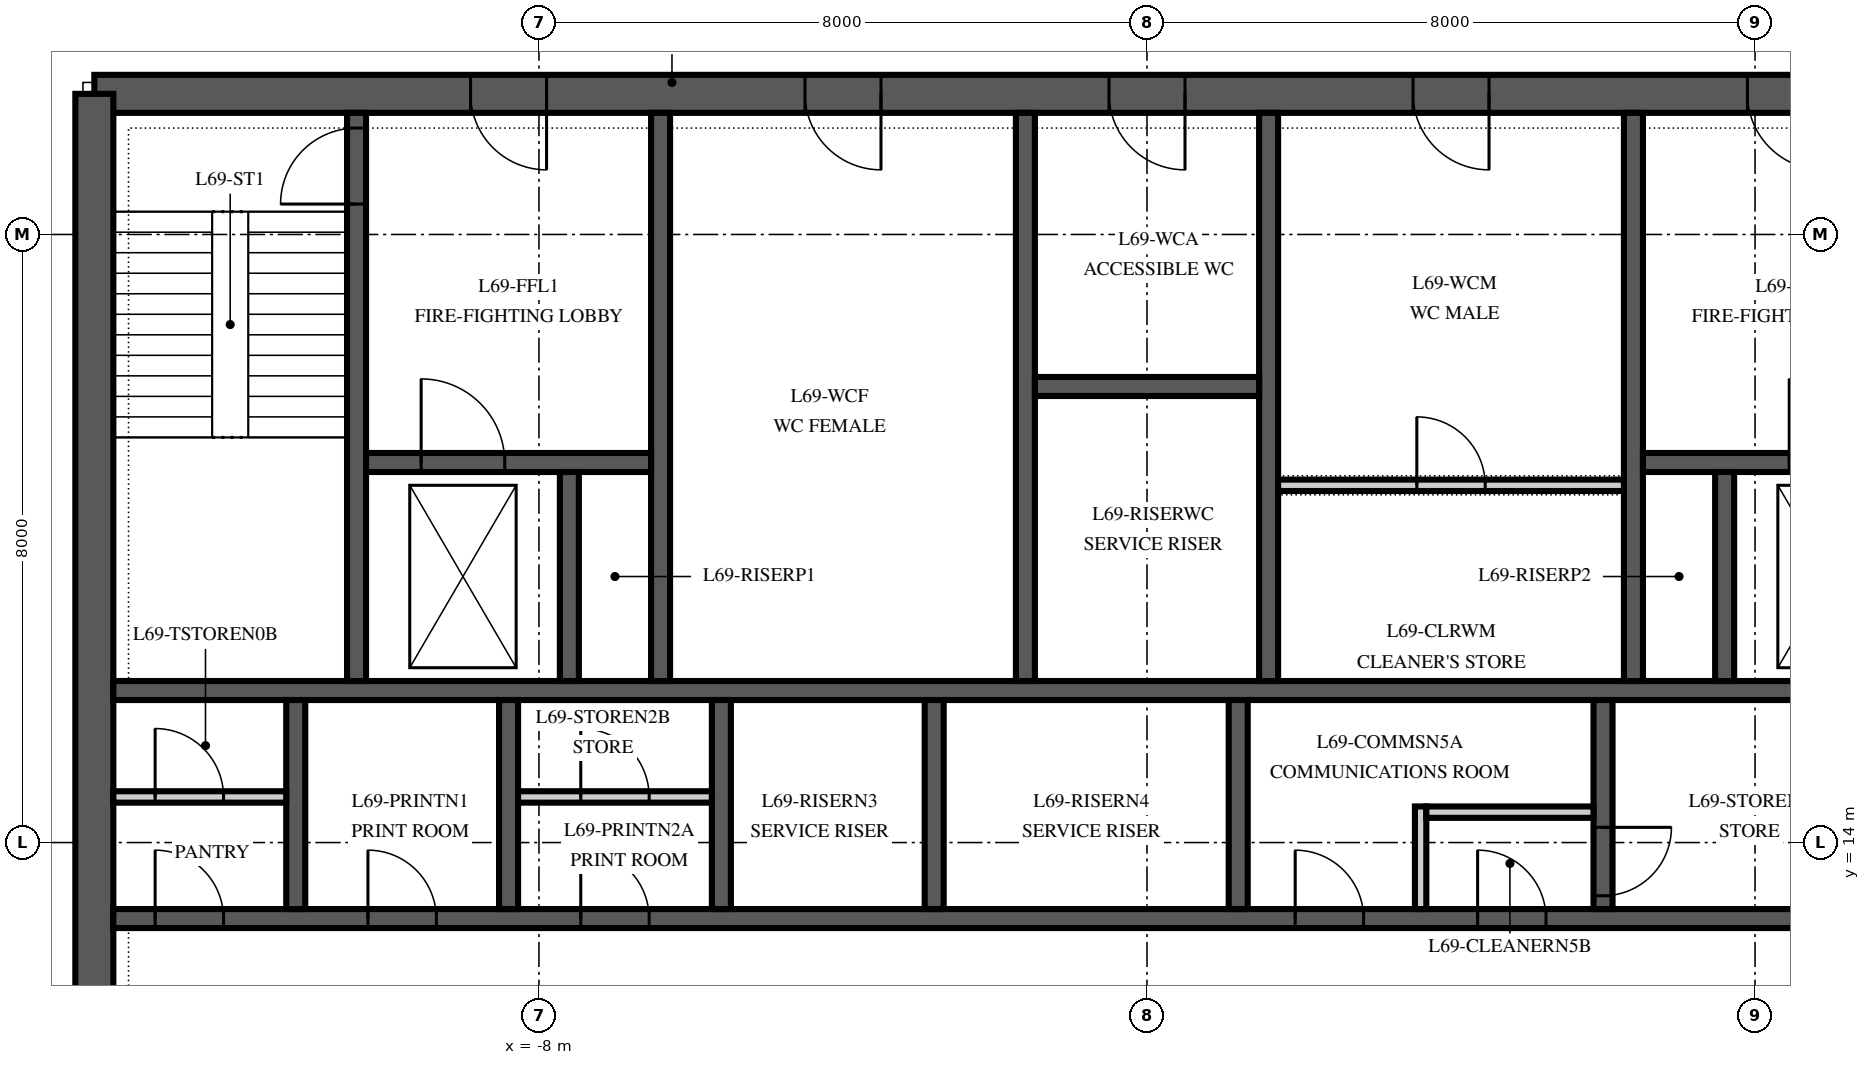
"""IFC4 building model, lengths in metres.
Left out: names, types, materials, properties, quantities, classifications, styles, units other than length and angle.
Written with IfcOpenShell. Run it as: python <this file> out.ifc"""

import sys

from ifc_helpers import new_model, si_unit, direction, frame, frame_2d, origin, place, context, subcontext, project, spatial, polyline, rectangle, outline, extrude, element, fill, save


model = new_model("IFC4")
c1 = context("Model", 3, precision=1e-05, world=origin(), true_north=direction((0.0, 1.0)))
c2 = subcontext(c1, "Body", "Model", "MODEL_VIEW")
j1 = project(units=[si_unit("LENGTHUNIT", "METRE"), si_unit("PLANEANGLEUNIT", "RADIAN")], contexts=[c1])
p1 = place(None, origin())
s1 = spatial("IfcSite", under=j1, at=p1, CompositionType="ELEMENT")
p2 = place(p1, origin())
s2 = spatial("IfcBuilding", under=s1, at=p2, CompositionType="ELEMENT")
p3 = place(p2, frame((0.0, 0.0, 296.0)))
s3 = spatial("IfcBuildingStorey", under=s2, at=p3, CompositionType="ELEMENT", Elevation=296.0)
p4 = place(p3, frame((13.85, 23.85, 0.0), z_axis=(0.0, 0.0, 1.0), x_axis=(-1.0, 0.0, 0.0)))
e1 = element("IfcWall", 1, at=p4, inside=s3, PredefinedType="SHEAR", context=c2, shape_type="SweptSolid", body=[
    extrude(rectangle(XDim=27.7, YDim=0.5, at=frame_2d((13.85, 0.0))), origin(), (0.0, 0.0, 1.0), 4.0),
])
p5 = place(p4, frame((21.75, 0.0, 0.0)))
e2 = element("IfcOpeningElement", 2, at=p5, cuts=e1, PredefinedType="OPENING", context=c2, shape_type="SweptSolid", body=[
    extrude(rectangle(XDim=1.0, YDim=2.1, at=frame_2d((0.5, 1.05))), frame((0.0, 0.265, 0.0), z_axis=(0.0, -1.0, 0.0), x_axis=(1.0, 0.0, 0.0)), (0.0, 0.0, 1.0), 0.53),
])
p6 = place(p4, frame((4.95, 0.0, 0.0)))
e3 = element("IfcOpeningElement", 3, at=p6, cuts=e1, PredefinedType="OPENING", context=c2, shape_type="SweptSolid", body=[
    extrude(rectangle(XDim=1.0, YDim=2.1, at=frame_2d((0.5, 1.05))), frame((0.0, 0.265, 0.0), z_axis=(0.0, -1.0, 0.0), x_axis=(1.0, 0.0, 0.0)), (0.0, 0.0, 1.0), 0.53),
])
p7 = place(p4, frame((17.35, 0.0, 0.0)))
e4 = element("IfcOpeningElement", 4, at=p7, cuts=e1, PredefinedType="OPENING", context=c2, shape_type="SweptSolid", body=[
    extrude(rectangle(XDim=1.0, YDim=2.1, at=frame_2d((0.5, 1.05))), frame((0.0, 0.265, 0.0), z_axis=(0.0, -1.0, 0.0), x_axis=(1.0, 0.0, 0.0)), (0.0, 0.0, 1.0), 0.53),
])
p8 = place(p4, frame((13.35, 0.0, 0.0)))
e5 = element("IfcOpeningElement", 5, at=p8, cuts=e1, PredefinedType="OPENING", context=c2, shape_type="SweptSolid", body=[
    extrude(rectangle(XDim=1.0, YDim=2.1, at=frame_2d((0.5, 1.05))), frame((0.0, 0.265, 0.0), z_axis=(0.0, -1.0, 0.0), x_axis=(1.0, 0.0, 0.0)), (0.0, 0.0, 1.0), 0.53),
])
p9 = place(p4, frame((9.35, 0.0, 0.0)))
e6 = element("IfcOpeningElement", 6, at=p9, cuts=e1, PredefinedType="OPENING", context=c2, shape_type="SweptSolid", body=[
    extrude(rectangle(XDim=1.0, YDim=2.1, at=frame_2d((0.5, 1.05))), frame((0.0, 0.265, 0.0), z_axis=(0.0, -1.0, 0.0), x_axis=(1.0, 0.0, 0.0)), (0.0, 0.0, 1.0), 0.53),
])
p10 = place(p3, frame((-13.85, 23.85, 0.0), z_axis=(0.0, 0.0, 1.0), x_axis=(0.0, -1.0, 0.0)))
e7 = element("IfcWall", 7, at=p10, inside=s3, PredefinedType="SHEAR", context=c2, shape_type="SweptSolid", body=[
    extrude(outline(polyline([(0.0, -0.25), (17.7, -0.25), (17.7, 0.0), (17.45, 0.0), (17.45, 0.25), (0.25, 0.25), (0.25, 0.0), (0.0, 0.0), (0.0, -0.25)])), origin(), (0.0, 0.0, 1.0), 4.0),
])
p11 = place(p10, frame((11.75, 0.0, 0.0)))
e8 = element("IfcOpeningElement", 8, at=p11, cuts=e7, PredefinedType="OPENING", context=c2, shape_type="SweptSolid", body=[
    extrude(rectangle(XDim=1.8, YDim=2.4, at=frame_2d((0.9, 1.2))), frame((0.0, 0.265, 0.0), z_axis=(0.0, -1.0, 0.0), x_axis=(1.0, 0.0, 0.0)), (0.0, 0.0, 1.0), 0.53),
])
p12 = place(p3, frame((-13.6, 13.0, 0.0), z_axis=(0.0, 0.0, 1.0), x_axis=(1.0, 0.0, 0.0)))
e9 = element("IfcWall", 9, at=p12, inside=s3, PredefinedType="SHEAR", context=c2, shape_type="SweptSolid", body=[
    extrude(rectangle(XDim=27.2, YDim=0.25, at=frame_2d((13.6, 0.0))), origin(), (0.0, 0.0, 1.0), 4.0),
])
p13 = place(p12, frame((15.55, 0.0, 0.0)))
e10 = element("IfcOpeningElement", 10, at=p13, cuts=e9, PredefinedType="OPENING", context=c2, shape_type="SweptSolid", body=[
    extrude(rectangle(XDim=0.9, YDim=2.1, at=frame_2d((0.45, 1.05))), frame((0.0, 0.14, 0.0), z_axis=(0.0, -1.0, 0.0), x_axis=(1.0, 0.0, 0.0)), (0.0, 0.0, 1.0), 0.28),
])
p14 = place(p12, frame((17.95, 0.0, 0.0)))
e11 = element("IfcOpeningElement", 11, at=p14, cuts=e9, PredefinedType="OPENING", context=c2, shape_type="SweptSolid", body=[
    extrude(rectangle(XDim=0.9, YDim=2.1, at=frame_2d((0.45, 1.05))), frame((0.0, 0.14, 0.0), z_axis=(0.0, -1.0, 0.0), x_axis=(1.0, 0.0, 0.0)), (0.0, 0.0, 1.0), 0.28),
])
p15 = place(p12, frame((0.55, 0.0, 0.0)))
e12 = element("IfcOpeningElement", 12, at=p15, cuts=e9, PredefinedType="OPENING", context=c2, shape_type="SweptSolid", body=[
    extrude(rectangle(XDim=0.9, YDim=2.1, at=frame_2d((0.45, 1.05))), frame((0.0, 0.14, 0.0), z_axis=(0.0, -1.0, 0.0), x_axis=(1.0, 0.0, 0.0)), (0.0, 0.0, 1.0), 0.28),
])
p16 = place(p12, frame((3.35, 0.0, 0.0)))
e13 = element("IfcOpeningElement", 13, at=p16, cuts=e9, PredefinedType="OPENING", context=c2, shape_type="SweptSolid", body=[
    extrude(rectangle(XDim=0.9, YDim=2.1, at=frame_2d((0.45, 1.05))), frame((0.0, 0.14, 0.0), z_axis=(0.0, -1.0, 0.0), x_axis=(1.0, 0.0, 0.0)), (0.0, 0.0, 1.0), 0.28),
])
p17 = place(p12, frame((6.15, 0.0, 0.0)))
e14 = element("IfcOpeningElement", 14, at=p17, cuts=e9, PredefinedType="OPENING", context=c2, shape_type="SweptSolid", body=[
    extrude(rectangle(XDim=0.9, YDim=2.1, at=frame_2d((0.45, 1.05))), frame((0.0, 0.14, 0.0), z_axis=(0.0, -1.0, 0.0), x_axis=(1.0, 0.0, 0.0)), (0.0, 0.0, 1.0), 0.28),
])
p18 = place(p3, frame((-13.6, 16.0, 0.0), z_axis=(0.0, 0.0, 1.0), x_axis=(1.0, 0.0, 0.0)))
e15 = element("IfcWall", 15, at=p18, inside=s3, PredefinedType="SHEAR", context=c2, shape_type="SweptSolid", body=[
    extrude(rectangle(XDim=27.2, YDim=0.25, at=frame_2d((13.6, 0.0))), origin(), (0.0, 0.0, 1.0), 4.0),
])
for number, where, z_axis, x_axis in (
    (16, (-11.2, 13.125, 0.0), (0.0, 0.0, 1.0), (0.0, 1.0, 0.0)),
    (17, (-8.4, 13.125, 0.0), (0.0, 0.0, 1.0), (0.0, 1.0, 0.0)),
    (18, (-5.6, 13.125, 0.0), (0.0, 0.0, 1.0), (0.0, 1.0, 0.0)),
    (19, (-2.8, 13.125, 0.0), (0.0, 0.0, 1.0), (0.0, 1.0, 0.0)),
    (20, (1.2, 13.125, 0.0), (0.0, 0.0, 1.0), (0.0, 1.0, 0.0)),
):
    element("IfcWall", number, at=place(p3, frame(where, z_axis=z_axis, x_axis=x_axis)), inside=s3, PredefinedType="SHEAR", context=c2, shape_type="SweptSolid", body=[
        extrude(rectangle(XDim=2.75, YDim=0.25, at=frame_2d((1.375, 0.0))), origin(), (0.0, 0.0, 1.0), 4.0),
    ])
p19 = place(p3, frame((6.0, 13.125, 0.0), z_axis=(0.0, 0.0, 1.0), x_axis=(0.0, 1.0, 0.0)))
e21 = element("IfcWall", 21, at=p19, inside=s3, PredefinedType="SHEAR", context=c2, shape_type="SweptSolid", body=[
    extrude(rectangle(XDim=2.75, YDim=0.25, at=frame_2d((1.375, 0.0))), origin(), (0.0, 0.0, 1.0), 4.0),
])
p20 = place(p19, frame((0.175, 0.0, 0.0)))
e22 = element("IfcOpeningElement", 22, at=p20, cuts=e21, PredefinedType="OPENING", context=c2, shape_type="SweptSolid", body=[
    extrude(rectangle(XDim=0.9, YDim=2.1, at=frame_2d((0.45, 1.05))), frame((0.0, 0.14, 0.0), z_axis=(0.0, -1.0, 0.0), x_axis=(1.0, 0.0, 0.0)), (0.0, 0.0, 1.0), 0.28),
])
p21 = place(p3, frame((-10.4, 16.125, 0.0), z_axis=(0.0, 0.0, 1.0), x_axis=(0.0, 1.0, 0.0)))
e23 = element("IfcWall", 23, at=p21, inside=s3, PredefinedType="SHEAR", context=c2, shape_type="SweptSolid", body=[
    extrude(rectangle(XDim=7.475, YDim=0.25, at=frame_2d((3.738, 0.0))), origin(), (0.0, 0.0, 1.0), 4.0),
])
p22 = place(p21, frame((6.275, 0.0, 0.0)))
e24 = element("IfcOpeningElement", 24, at=p22, cuts=e23, PredefinedType="OPENING", context=c2, shape_type="SweptSolid", body=[
    extrude(rectangle(XDim=1.0, YDim=2.1, at=frame_2d((0.5, 1.05))), frame((0.0, 0.14, 0.0), z_axis=(0.0, -1.0, 0.0), x_axis=(1.0, 0.0, 0.0)), (0.0, 0.0, 1.0), 0.28),
])
for number, where, z_axis, x_axis in (
    (25, (-6.4, 16.125, 0.0), (0.0, 0.0, 1.0), (0.0, 1.0, 0.0)),
    (26, (-1.6, 16.125, 0.0), (0.0, 0.0, 1.0), (0.0, 1.0, 0.0)),
    (27, (1.6, 16.125, 0.0), (0.0, 0.0, 1.0), (0.0, 1.0, 0.0)),
    (28, (6.4, 16.125, 0.0), (0.0, 0.0, 1.0), (0.0, 1.0, 0.0)),
):
    element("IfcWall", number, at=place(p3, frame(where, z_axis=z_axis, x_axis=x_axis)), inside=s3, PredefinedType="SHEAR", context=c2, shape_type="SweptSolid", body=[
        extrude(rectangle(XDim=7.475, YDim=0.25, at=frame_2d((3.738, 0.0))), origin(), (0.0, 0.0, 1.0), 4.0),
    ])
p23 = place(p3, frame((-10.275, 19.0, 0.0), z_axis=(0.0, 0.0, 1.0), x_axis=(1.0, 0.0, 0.0)))
e29 = element("IfcWall", 29, at=p23, inside=s3, PredefinedType="SHEAR", context=c2, shape_type="SweptSolid", body=[
    extrude(rectangle(XDim=3.75, YDim=0.25, at=frame_2d((1.875, 0.0))), origin(), (0.0, 0.0, 1.0), 4.0),
])
p24 = place(p23, frame((0.725, 0.0, 0.0)))
e30 = element("IfcOpeningElement", 30, at=p24, cuts=e29, PredefinedType="OPENING", context=c2, shape_type="SweptSolid", body=[
    extrude(rectangle(XDim=1.1, YDim=2.1, at=frame_2d((0.55, 1.05))), frame((0.0, 0.14, 0.0), z_axis=(0.0, -1.0, 0.0), x_axis=(1.0, 0.0, 0.0)), (0.0, 0.0, 1.0), 0.28),
])
p25 = place(p3, frame((6.525, 19.0, 0.0), z_axis=(0.0, 0.0, 1.0), x_axis=(1.0, 0.0, 0.0)))
e31 = element("IfcWall", 31, at=p25, inside=s3, PredefinedType="SHEAR", context=c2, shape_type="SweptSolid", body=[
    extrude(rectangle(XDim=3.75, YDim=0.25, at=frame_2d((1.875, 0.0))), origin(), (0.0, 0.0, 1.0), 4.0),
])
p26 = place(p25, frame((1.925, 0.0, 0.0)))
e32 = element("IfcOpeningElement", 32, at=p26, cuts=e31, PredefinedType="OPENING", context=c2, shape_type="SweptSolid", body=[
    extrude(rectangle(XDim=1.1, YDim=2.1, at=frame_2d((0.55, 1.05))), frame((0.0, 0.14, 0.0), z_axis=(0.0, -1.0, 0.0), x_axis=(1.0, 0.0, 0.0)), (0.0, 0.0, 1.0), 0.28),
])
for number, where, z_axis, x_axis in (
    (33, (-7.6, 16.125, 0.0), (0.0, 0.0, 1.0), (0.0, 1.0, 0.0)),
    (34, (7.6, 16.125, 0.0), (0.0, 0.0, 1.0), (0.0, 1.0, 0.0)),
):
    element("IfcWall", number, at=place(p3, frame(where, z_axis=z_axis, x_axis=x_axis)), inside=s3, PredefinedType="SHEAR", context=c2, shape_type="SweptSolid", body=[
        extrude(rectangle(XDim=2.75, YDim=0.25, at=frame_2d((1.375, 0.0))), origin(), (0.0, 0.0, 1.0), 4.0),
    ])
p27 = place(p3, frame((-1.475, 20.0, 0.0), z_axis=(0.0, 0.0, 1.0), x_axis=(1.0, 0.0, 0.0)))
e35 = element("IfcWall", 35, at=p27, inside=s3, PredefinedType="SHEAR", context=c2, shape_type="SweptSolid", body=[
    extrude(rectangle(XDim=2.95, YDim=0.25, at=frame_2d((1.475, 0.0))), origin(), (0.0, 0.0, 1.0), 4.0),
])
p28 = place(p3, frame((1.725, 18.7, 0.0), z_axis=(0.0, 0.0, 1.0), x_axis=(1.0, 0.0, 0.0)))
e36 = element("IfcWall", 36, at=p28, inside=s3, PredefinedType="PARTITIONING", context=c2, shape_type="SweptSolid", body=[
    extrude(rectangle(XDim=4.55, YDim=0.15, at=frame_2d((2.275, 0.0))), origin(), (0.0, 0.0, 1.0), 3.85),
])
p29 = place(p28, frame((1.825, 0.0, 0.0)))
e37 = element("IfcOpeningElement", 37, at=p29, cuts=e36, PredefinedType="OPENING", context=c2, shape_type="SweptSolid", body=[
    extrude(rectangle(XDim=0.9, YDim=2.1, at=frame_2d((0.45, 1.05))), frame((0.0, 0.09, 0.0), z_axis=(0.0, -1.0, 0.0), x_axis=(1.0, 0.0, 0.0)), (0.0, 0.0, 1.0), 0.18),
])
p30 = place(p3, frame((3.6, 13.125, 0.0), z_axis=(0.0, 0.0, 1.0), x_axis=(0.0, 1.0, 0.0)))
e38 = element("IfcWall", 38, at=p30, inside=s3, PredefinedType="PARTITIONING", context=c2, shape_type="SweptSolid", body=[
    extrude(rectangle(XDim=1.35, YDim=0.15, at=frame_2d((0.675, 0.0))), origin(), (0.0, 0.0, 1.0), 3.85),
])
p31 = place(p3, frame((3.675, 14.4, 0.0), z_axis=(0.0, 0.0, 1.0), x_axis=(1.0, 0.0, 0.0)))
e39 = element("IfcWall", 39, at=p31, inside=s3, PredefinedType="PARTITIONING", context=c2, shape_type="SweptSolid", body=[
    extrude(rectangle(XDim=2.2, YDim=0.15, at=frame_2d((1.1, 0.0))), origin(), (0.0, 0.0, 1.0), 3.85),
])
p32 = place(p3, frame((-13.6, 14.6, 0.0), z_axis=(0.0, 0.0, 1.0), x_axis=(1.0, 0.0, 0.0)))
e40 = element("IfcWall", 40, at=p32, inside=s3, PredefinedType="PARTITIONING", context=c2, shape_type="SweptSolid", body=[
    extrude(rectangle(XDim=2.275, YDim=0.15, at=frame_2d((1.138, 0.0))), origin(), (0.0, 0.0, 1.0), 3.85),
])
p33 = place(p32, frame((0.55, 0.0, 0.0)))
e41 = element("IfcOpeningElement", 41, at=p33, cuts=e40, PredefinedType="OPENING", context=c2, shape_type="SweptSolid", body=[
    extrude(rectangle(XDim=0.9, YDim=2.1, at=frame_2d((0.45, 1.05))), frame((0.0, 0.09, 0.0), z_axis=(0.0, -1.0, 0.0), x_axis=(1.0, 0.0, 0.0)), (0.0, 0.0, 1.0), 0.18),
])
p34 = place(p3, frame((-8.275, 14.6, 0.0), z_axis=(0.0, 0.0, 1.0), x_axis=(1.0, 0.0, 0.0)))
e42 = element("IfcWall", 42, at=p34, inside=s3, PredefinedType="PARTITIONING", context=c2, shape_type="SweptSolid", body=[
    extrude(rectangle(XDim=2.55, YDim=0.15, at=frame_2d((1.275, 0.0))), origin(), (0.0, 0.0, 1.0), 3.85),
])
p35 = place(p34, frame((0.825, 0.0, 0.0)))
e43 = element("IfcOpeningElement", 43, at=p35, cuts=e42, PredefinedType="OPENING", context=c2, shape_type="SweptSolid", body=[
    extrude(rectangle(XDim=0.9, YDim=2.1, at=frame_2d((0.45, 1.05))), frame((0.0, 0.09, 0.0), z_axis=(0.0, -1.0, 0.0), x_axis=(1.0, 0.0, 0.0)), (0.0, 0.0, 1.0), 0.18),
])
p36 = place(p5, origin())
e44 = element("IfcDoor", 44, at=p36, inside=s3, OperationType="SINGLE_SWING_RIGHT", PredefinedType="DOOR", context=c2, shape_type="SweptSolid", body=[
    extrude(rectangle(XDim=1.0, YDim=2.1, at=frame_2d((0.5, 1.05))), frame((0.0, 0.25, 0.0), z_axis=(0.0, -1.0, 0.0), x_axis=(1.0, 0.0, 0.0)), (0.0, 0.0, 1.0), 0.5),
])
fill(e2, e44)
p37 = place(p6, origin())
e45 = element("IfcDoor", 45, at=p37, inside=s3, OperationType="SINGLE_SWING_RIGHT", PredefinedType="DOOR", context=c2, shape_type="SweptSolid", body=[
    extrude(rectangle(XDim=1.0, YDim=2.1, at=frame_2d((0.5, 1.05))), frame((0.0, 0.25, 0.0), z_axis=(0.0, -1.0, 0.0), x_axis=(1.0, 0.0, 0.0)), (0.0, 0.0, 1.0), 0.5),
])
fill(e3, e45)
p38 = place(p7, origin())
e46 = element("IfcDoor", 46, at=p38, inside=s3, OperationType="SINGLE_SWING_LEFT", PredefinedType="DOOR", context=c2, shape_type="SweptSolid", body=[
    extrude(rectangle(XDim=1.0, YDim=2.1, at=frame_2d((0.5, 1.05))), frame((0.0, 0.25, 0.0), z_axis=(0.0, -1.0, 0.0), x_axis=(1.0, 0.0, 0.0)), (0.0, 0.0, 1.0), 0.5),
])
fill(e4, e46)
p39 = place(p8, origin())
e47 = element("IfcDoor", 47, at=p39, inside=s3, OperationType="SINGLE_SWING_LEFT", PredefinedType="DOOR", context=c2, shape_type="SweptSolid", body=[
    extrude(rectangle(XDim=1.0, YDim=2.1, at=frame_2d((0.5, 1.05))), frame((0.0, 0.25, 0.0), z_axis=(0.0, -1.0, 0.0), x_axis=(1.0, 0.0, 0.0)), (0.0, 0.0, 1.0), 0.5),
])
fill(e5, e47)
p40 = place(p9, origin())
e48 = element("IfcDoor", 48, at=p40, inside=s3, OperationType="SINGLE_SWING_LEFT", PredefinedType="DOOR", context=c2, shape_type="SweptSolid", body=[
    extrude(rectangle(XDim=1.0, YDim=2.1, at=frame_2d((0.5, 1.05))), frame((0.0, 0.25, 0.0), z_axis=(0.0, -1.0, 0.0), x_axis=(1.0, 0.0, 0.0)), (0.0, 0.0, 1.0), 0.5),
])
fill(e6, e48)
p41 = place(p22, origin())
e49 = element("IfcDoor", 49, at=p41, inside=s3, OperationType="SINGLE_SWING_LEFT", PredefinedType="DOOR", context=c2, shape_type="SweptSolid", body=[
    extrude(rectangle(XDim=1.0, YDim=2.1, at=frame_2d((0.5, 1.05))), frame((0.0, 0.125, 0.0), z_axis=(0.0, -1.0, 0.0), x_axis=(1.0, 0.0, 0.0)), (0.0, 0.0, 1.0), 0.25),
])
fill(e24, e49)
p42 = place(p26, origin())
e50 = element("IfcDoor", 50, at=p42, inside=s3, OperationType="SLIDING_TO_RIGHT", PredefinedType="DOOR", context=c2, shape_type="SweptSolid", body=[
    extrude(rectangle(XDim=1.1, YDim=2.1, at=frame_2d((0.55, 1.05))), frame((0.0, 0.125, 0.0), z_axis=(0.0, -1.0, 0.0), x_axis=(1.0, 0.0, 0.0)), (0.0, 0.0, 1.0), 0.25),
])
fill(e32, e50)
p43 = place(p24, origin())
e51 = element("IfcDoor", 51, at=p43, inside=s3, OperationType="SLIDING_TO_RIGHT", PredefinedType="DOOR", context=c2, shape_type="SweptSolid", body=[
    extrude(rectangle(XDim=1.1, YDim=2.1, at=frame_2d((0.55, 1.05))), frame((0.0, 0.125, 0.0), z_axis=(0.0, -1.0, 0.0), x_axis=(1.0, 0.0, 0.0)), (0.0, 0.0, 1.0), 0.25),
])
fill(e30, e51)
p44 = place(p13, origin())
e52 = element("IfcDoor", 52, at=p44, inside=s3, OperationType="SINGLE_SWING_LEFT", PredefinedType="DOOR", context=c2, shape_type="SweptSolid", body=[
    extrude(rectangle(XDim=0.9, YDim=2.1, at=frame_2d((0.45, 1.05))), frame((0.0, 0.125, 0.0), z_axis=(0.0, -1.0, 0.0), x_axis=(1.0, 0.0, 0.0)), (0.0, 0.0, 1.0), 0.25),
])
fill(e10, e52)
p45 = place(p14, origin())
e53 = element("IfcDoor", 53, at=p45, inside=s3, OperationType="SINGLE_SWING_LEFT", PredefinedType="DOOR", context=c2, shape_type="SweptSolid", body=[
    extrude(rectangle(XDim=0.9, YDim=2.1, at=frame_2d((0.45, 1.05))), frame((0.0, 0.125, 0.0), z_axis=(0.0, -1.0, 0.0), x_axis=(1.0, 0.0, 0.0)), (0.0, 0.0, 1.0), 0.25),
])
fill(e11, e53)
p46 = place(p20, frame((0.9, 0.0, 0.0), z_axis=(0.0, 0.0, 1.0), x_axis=(-1.0, 0.0, 0.0)))
e54 = element("IfcDoor", 54, at=p46, inside=s3, OperationType="SINGLE_SWING_LEFT", PredefinedType="DOOR", context=c2, shape_type="SweptSolid", body=[
    extrude(rectangle(XDim=0.9, YDim=2.1, at=frame_2d((0.45, 1.05))), frame((0.0, 0.125, 0.0), z_axis=(0.0, -1.0, 0.0), x_axis=(1.0, 0.0, 0.0)), (0.0, 0.0, 1.0), 0.25),
])
fill(e22, e54)
p47 = place(p15, origin())
e55 = element("IfcDoor", 55, at=p47, inside=s3, OperationType="SINGLE_SWING_LEFT", PredefinedType="DOOR", context=c2, shape_type="SweptSolid", body=[
    extrude(rectangle(XDim=0.9, YDim=2.1, at=frame_2d((0.45, 1.05))), frame((0.0, 0.125, 0.0), z_axis=(0.0, -1.0, 0.0), x_axis=(1.0, 0.0, 0.0)), (0.0, 0.0, 1.0), 0.25),
])
fill(e12, e55)
p48 = place(p33, origin())
e56 = element("IfcDoor", 56, at=p48, inside=s3, OperationType="SINGLE_SWING_LEFT", PredefinedType="DOOR", context=c2, shape_type="SweptSolid", body=[
    extrude(rectangle(XDim=0.9, YDim=2.1, at=frame_2d((0.45, 1.05))), frame((0.0, 0.075, 0.0), z_axis=(0.0, -1.0, 0.0), x_axis=(1.0, 0.0, 0.0)), (0.0, 0.0, 1.0), 0.149),
])
fill(e41, e56)
p49 = place(p16, origin())
e57 = element("IfcDoor", 57, at=p49, inside=s3, OperationType="SINGLE_SWING_LEFT", PredefinedType="DOOR", context=c2, shape_type="SweptSolid", body=[
    extrude(rectangle(XDim=0.9, YDim=2.1, at=frame_2d((0.45, 1.05))), frame((0.0, 0.125, 0.0), z_axis=(0.0, -1.0, 0.0), x_axis=(1.0, 0.0, 0.0)), (0.0, 0.0, 1.0), 0.25),
])
fill(e13, e57)
p50 = place(p17, origin())
e58 = element("IfcDoor", 58, at=p50, inside=s3, OperationType="SINGLE_SWING_LEFT", PredefinedType="DOOR", context=c2, shape_type="SweptSolid", body=[
    extrude(rectangle(XDim=0.9, YDim=2.1, at=frame_2d((0.45, 1.05))), frame((0.0, 0.125, 0.0), z_axis=(0.0, -1.0, 0.0), x_axis=(1.0, 0.0, 0.0)), (0.0, 0.0, 1.0), 0.25),
])
fill(e14, e58)
p51 = place(p35, origin())
e59 = element("IfcDoor", 59, at=p51, inside=s3, OperationType="SINGLE_SWING_LEFT", PredefinedType="DOOR", context=c2, shape_type="SweptSolid", body=[
    extrude(rectangle(XDim=0.9, YDim=2.1, at=frame_2d((0.45, 1.05))), frame((0.0, 0.075, 0.0), z_axis=(0.0, -1.0, 0.0), x_axis=(1.0, 0.0, 0.0)), (0.0, 0.0, 1.0), 0.149),
])
fill(e43, e59)
p52 = place(p29, origin())
e60 = element("IfcDoor", 60, at=p52, inside=s3, OperationType="SINGLE_SWING_LEFT", PredefinedType="DOOR", context=c2, shape_type="SweptSolid", body=[
    extrude(rectangle(XDim=0.9, YDim=2.1, at=frame_2d((0.45, 1.05))), frame((0.0, 0.075, 0.0), z_axis=(0.0, -1.0, 0.0), x_axis=(1.0, 0.0, 0.0)), (0.0, 0.0, 1.0), 0.149),
])
fill(e37, e60)
save(model, sys.argv[1])
